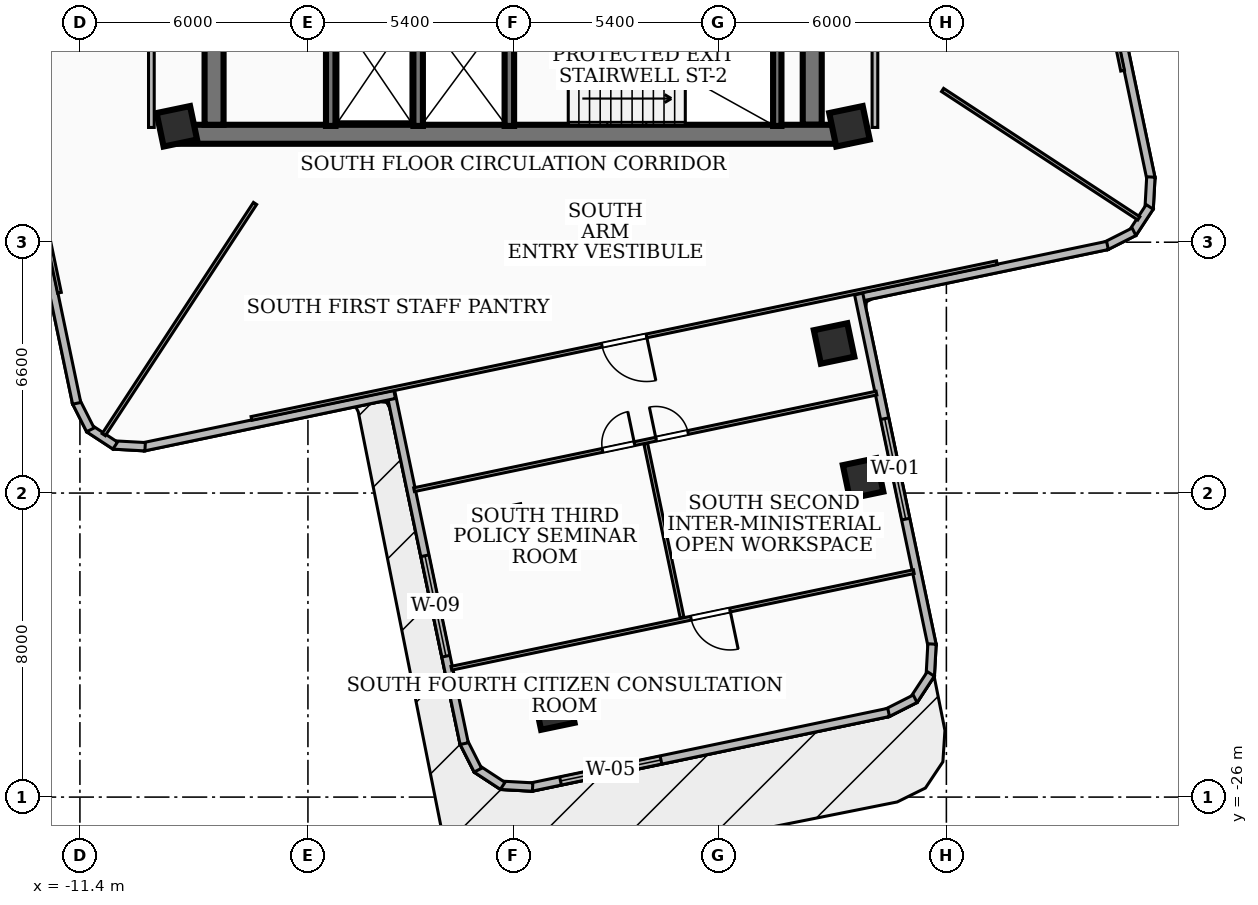
"""IFC4 building model, lengths in metres.
Left out: names, types, materials, properties, quantities, classifications, styles, units other than length and angle.
Written with IfcOpenShell. Run it as: python <this file> out.ifc"""

import sys

from ifc_helpers import new_model, si_unit, direction, frame, frame_2d, origin, origin_2d, place, context, subcontext, project, spatial, rectangle, extrude, element, fill, save


model = new_model("IFC4")
c1 = context("Model", 3, precision=1e-05, world=origin(), true_north=direction((0.0, 1.0)))
c2 = subcontext(c1, "Body", "Model", "MODEL_VIEW")
j1 = project(units=[si_unit("LENGTHUNIT", "METRE"), si_unit("PLANEANGLEUNIT", "RADIAN")], contexts=[c1])
p1 = place(None, origin())
s1 = spatial("IfcSite", under=j1, at=p1, CompositionType="ELEMENT")
p2 = place(p1, origin())
s2 = spatial("IfcBuilding", under=s1, at=p2, CompositionType="ELEMENT")
p3 = place(p2, frame((0.0, 0.0, 111.96)))
s3 = spatial("IfcBuildingStorey", under=s2, at=p3, CompositionType="ELEMENT", Elevation=111.96)
p4 = place(p3, frame((8.78, -8.56, 0.0), z_axis=(0.0, 0.0, 1.0), x_axis=(-1.0, 0.0, 0.0)))
e1 = element("IfcWall", 1, at=p4, inside=s3, PredefinedType="SHEAR", context=c2, shape_type="SweptSolid", body=[
    extrude(rectangle(XDim=17.56, YDim=0.5, at=frame_2d((8.78, 0.0))), origin(), (0.0, 0.0, 1.0), 4.06),
])
for number, where, z_axis, x_axis in (
    (2, (-7.87, -8.31, 0.0), (0.0, 0.0, 1.0), (0.0, 1.0, 0.0)),
    (3, (7.87, -2.0, 0.0), (0.0, 0.0, 1.0), (0.0, -1.0, 0.0)),
):
    element("IfcWall", number, at=place(p3, frame(where, z_axis=z_axis, x_axis=x_axis)), inside=s3, PredefinedType="SHEAR", context=c2, shape_type="SweptSolid", body=[
        extrude(rectangle(XDim=6.31, YDim=0.5, at=frame_2d((3.155, 0.0))), origin(), (0.0, 0.0, 1.0), 4.06),
    ])
p5 = place(p3, frame((6.95, -8.34, 0.0), z_axis=(0.0, 0.0, 1.0), x_axis=(0.0, 1.0, 0.0)))
e4 = element("IfcWall", 4, at=p5, inside=s3, PredefinedType="SOLIDWALL", context=c2, shape_type="SweptSolid", body=[
    extrude(rectangle(XDim=3.06, YDim=0.22, at=frame_2d((1.53, 0.0))), origin(), (0.0, 0.0, 1.0), 4.06),
])
for number, where, z_axis, x_axis in (
    (5, (-0.1, -8.34, 0.0), (0.0, 0.0, 1.0), (0.0, 1.0, 0.0)),
    (6, (-2.5, -8.34, 0.0), (0.0, 0.0, 1.0), (0.0, 1.0, 0.0)),
    (7, (-4.8, -8.34, 0.0), (0.0, 0.0, 1.0), (0.0, 1.0, 0.0)),
):
    element("IfcWall", number, at=place(p3, frame(where, z_axis=z_axis, x_axis=x_axis)), inside=s3, PredefinedType="SOLIDWALL", context=c2, shape_type="SweptSolid", body=[
        extrude(rectangle(XDim=3.04, YDim=0.25, at=frame_2d((1.52, 0.0))), origin(), (0.0, 0.0, 1.0), 4.06),
    ])
for number, where, z_axis, x_axis in (
    (8, (8.85, -8.35, 0.0), (0.0, 0.0, 1.0), (0.979, 0.204, 0.0)),
    (9, (-8.85, -8.35, 0.0), (0.0, 0.0, 1.0), (0.979, 0.204, 0.0)),
    (10, (-0.183, -18.86, 0.0), (0.0, 0.0, 1.0), (0.979, 0.204, 0.0)),
    (11, (8.445, -14.064, 0.0), (0.0, 0.0, 1.0), (0.979, 0.204, 0.0)),
    (12, (1.083, -23.697, 0.0), (0.0, 0.0, 1.0), (0.979, 0.204, 0.0)),
    (13, (9.208, -17.615, 0.0), (0.0, 0.0, 1.0), (0.979, 0.204, 0.0)),
):
    element("IfcColumn", number, at=place(p3, frame(where, z_axis=z_axis, x_axis=x_axis)), inside=s3, PredefinedType="COLUMN", context=c2, shape_type="SweptSolid", body=[
        extrude(rectangle(XDim=0.9, YDim=0.9, at=origin_2d()), origin(), (0.0, 0.0, 1.0), 4.32),
    ])
p6 = place(p3, frame((15.403, -3.119, 0.0), z_axis=(0.0, 0.0, 1.0), x_axis=(0.204509735336, -0.978864530031, 0.0)))
e14 = element("IfcWall", 14, at=p6, inside=s3, PredefinedType="SOLIDWALL", context=c2, shape_type="SweptSolid", body=[
    extrude(rectangle(XDim=6.757, YDim=0.22, at=frame_2d((3.378, 0.0))), origin(), (0.0, 0.0, 1.0), 4.06),
])
p7 = place(p3, frame((16.781, -9.684, 0.0), z_axis=(0.0, 0.0, 1.0), x_axis=(-0.055016197793, -0.998485462078, 0.0)))
e15 = element("IfcWall", 15, at=p7, inside=s3, PredefinedType="SOLIDWALL", context=c2, shape_type="SweptSolid", body=[
    extrude(rectangle(XDim=0.834, YDim=0.22, at=frame_2d((0.417, 0.0))), origin(), (0.0, 0.0, 1.0), 4.06),
])
p8 = place(p3, frame((16.75, -10.471, 0.0), z_axis=(0.0, 0.0, 1.0), x_axis=(-0.54760232045, -0.836738727822, 0.0)))
e16 = element("IfcWall", 16, at=p8, inside=s3, PredefinedType="SOLIDWALL", context=c2, shape_type="SweptSolid", body=[
    extrude(rectangle(XDim=0.82, YDim=0.22, at=frame_2d((0.41, 0.0))), origin(), (0.0, 0.0, 1.0), 4.06),
])
p9 = place(p3, frame((16.337, -11.125, 0.0), z_axis=(0.0, 0.0, 1.0), x_axis=(-0.892485652426, -0.45107578101, 0.0)))
e17 = element("IfcWall", 17, at=p9, inside=s3, PredefinedType="SOLIDWALL", context=c2, shape_type="SweptSolid", body=[
    extrude(rectangle(XDim=0.833, YDim=0.22, at=frame_2d((0.417, 0.0))), origin(), (0.0, 0.0, 1.0), 4.06),
])
p10 = place(p3, frame((15.639, -11.485, 0.0), z_axis=(0.0, 0.0, 1.0), x_axis=(-0.978870573598, -0.204480806295, 0.0)))
e18 = element("IfcWall", 18, at=p10, inside=s3, PredefinedType="SOLIDWALL", context=c2, shape_type="SweptSolid", body=[
    extrude(rectangle(XDim=6.758, YDim=0.22, at=frame_2d((3.379, 0.0))), origin(), (0.0, 0.0, 1.0), 4.06),
])
p11 = place(p3, frame((9.092, -12.763, 0.0), z_axis=(0.0, 0.0, 1.0), x_axis=(0.204468605798, -0.978873122137, 0.0)))
e19 = element("IfcWall", 19, at=p11, inside=s3, PredefinedType="SOLIDWALL", context=c2, shape_type="SweptSolid", body=[
    extrude(rectangle(XDim=9.458, YDim=0.22, at=frame_2d((4.729, 0.0))), origin(), (0.0, 0.0, 1.0), 4.06),
])
p12 = place(p11, frame((3.35, 0.0, 0.85)))
e20 = element("IfcOpeningElement", 20, at=p12, cuts=e19, PredefinedType="OPENING", context=c2, shape_type="SweptSolid", body=[
    extrude(rectangle(XDim=2.7, YDim=2.1, at=frame_2d((1.35, 1.05))), frame((0.0, 0.12, 0.0), z_axis=(0.0, -1.0, 0.0), x_axis=(1.0, 0.0, 0.0)), (0.0, 0.0, 1.0), 0.24),
])
p13 = place(p3, frame((11.022, -21.972, 0.0), z_axis=(0.0, 0.0, 1.0), x_axis=(-0.055016197793, -0.998485462078, 0.0)))
e21 = element("IfcWall", 21, at=p13, inside=s3, PredefinedType="SOLIDWALL", context=c2, shape_type="SweptSolid", body=[
    extrude(rectangle(XDim=0.834, YDim=0.22, at=frame_2d((0.417, 0.0))), origin(), (0.0, 0.0, 1.0), 4.06),
])
p14 = place(p3, frame((10.991, -22.759, 0.0), z_axis=(0.0, 0.0, 1.0), x_axis=(-0.548148504297, -0.836381023958, 0.0)))
e22 = element("IfcWall", 22, at=p14, inside=s3, PredefinedType="SOLIDWALL", context=c2, shape_type="SweptSolid", body=[
    extrude(rectangle(XDim=0.819, YDim=0.22, at=frame_2d((0.41, 0.0))), origin(), (0.0, 0.0, 1.0), 4.06),
])
p15 = place(p3, frame((10.578, -23.412, 0.0), z_axis=(0.0, 0.0, 1.0), x_axis=(-0.892485652426, -0.45107578101, 0.0)))
e23 = element("IfcWall", 23, at=p15, inside=s3, PredefinedType="SOLIDWALL", context=c2, shape_type="SweptSolid", body=[
    extrude(rectangle(XDim=0.833, YDim=0.22, at=frame_2d((0.417, 0.0))), origin(), (0.0, 0.0, 1.0), 4.06),
])
p16 = place(p3, frame((9.88, -23.772, 0.0), z_axis=(0.0, 0.0, 1.0), x_axis=(-0.978873030385, -0.204469045054, 0.0)))
e24 = element("IfcWall", 24, at=p16, inside=s3, PredefinedType="SOLIDWALL", context=c2, shape_type="SweptSolid", body=[
    extrude(rectangle(XDim=9.62, YDim=0.22, at=frame_2d((4.81, 0.0))), origin(), (0.0, 0.0, 1.0), 4.06),
])
p17 = place(p16, frame((6.12, 0.0, 0.85)))
e25 = element("IfcOpeningElement", 25, at=p17, cuts=e24, PredefinedType="OPENING", context=c2, shape_type="SweptSolid", body=[
    extrude(rectangle(XDim=2.7, YDim=1.85, at=frame_2d((1.35, 0.925))), frame((0.0, 0.12, 0.0), z_axis=(0.0, -1.0, 0.0), x_axis=(1.0, 0.0, 0.0)), (0.0, 0.0, 1.0), 0.24),
])
p18 = place(p3, frame((0.512, -25.735, 0.0), z_axis=(0.0, 0.0, 1.0), x_axis=(-0.998469344193, 0.05530794433, 0.0)))
e26 = element("IfcWall", 26, at=p18, inside=s3, PredefinedType="SOLIDWALL", context=c2, shape_type="SweptSolid", body=[
    extrude(rectangle(XDim=0.834, YDim=0.22, at=frame_2d((0.417, 0.0))), origin(), (0.0, 0.0, 1.0), 4.06),
])
p19 = place(p3, frame((-0.275, -25.704, 0.0), z_axis=(0.0, 0.0, 1.0), x_axis=(-0.836244367386, 0.54835696222, 0.0)))
e27 = element("IfcWall", 27, at=p19, inside=s3, PredefinedType="SOLIDWALL", context=c2, shape_type="SweptSolid", body=[
    extrude(rectangle(XDim=0.819, YDim=0.22, at=frame_2d((0.41, 0.0))), origin(), (0.0, 0.0, 1.0), 4.06),
])
p20 = place(p3, frame((-0.928, -25.291, 0.0), z_axis=(0.0, 0.0, 1.0), x_axis=(-0.45107578101, 0.892485652426, 0.0)))
e28 = element("IfcWall", 28, at=p20, inside=s3, PredefinedType="SOLIDWALL", context=c2, shape_type="SweptSolid", body=[
    extrude(rectangle(XDim=0.833, YDim=0.22, at=frame_2d((0.417, 0.0))), origin(), (0.0, 0.0, 1.0), 4.06),
])
p21 = place(p3, frame((-1.288, -24.593, 0.0), z_axis=(0.0, 0.0, 1.0), x_axis=(-0.20456753982, 0.978852451421, 0.0)))
e29 = element("IfcWall", 29, at=p21, inside=s3, PredefinedType="SOLIDWALL", context=c2, shape_type="SweptSolid", body=[
    extrude(rectangle(XDim=9.458, YDim=0.22, at=frame_2d((4.729, 0.0))), origin(), (0.0, 0.0, 1.0), 3.29),
])
p22 = place(p21, frame((2.35, 0.0, 0.85)))
e30 = element("IfcOpeningElement", 30, at=p22, cuts=e29, PredefinedType="OPENING", context=c2, shape_type="SweptSolid", body=[
    extrude(rectangle(XDim=2.7, YDim=1.65, at=frame_2d((1.35, 0.825))), frame((0.0, 0.12, 0.0), z_axis=(0.0, -1.0, 0.0), x_axis=(1.0, 0.0, 0.0)), (0.0, 0.0, 1.0), 0.24),
])
p23 = place(p3, frame((-3.119, -15.403, 0.0), z_axis=(0.0, 0.0, 1.0), x_axis=(-0.978864530031, -0.204509735336, 0.0)))
e31 = element("IfcWall", 31, at=p23, inside=s3, PredefinedType="SOLIDWALL", context=c2, shape_type="SweptSolid", body=[
    extrude(rectangle(XDim=6.757, YDim=0.22, at=frame_2d((3.378, 0.0))), origin(), (0.0, 0.0, 1.0), 3.29),
])
p24 = place(p3, frame((-9.684, -16.781, 0.0), z_axis=(0.0, 0.0, 1.0), x_axis=(-0.998485462078, 0.055016197793, 0.0)))
e32 = element("IfcWall", 32, at=p24, inside=s3, PredefinedType="SOLIDWALL", context=c2, shape_type="SweptSolid", body=[
    extrude(rectangle(XDim=0.834, YDim=0.22, at=frame_2d((0.417, 0.0))), origin(), (0.0, 0.0, 1.0), 4.06),
])
p25 = place(p3, frame((-10.471, -16.75, 0.0), z_axis=(0.0, 0.0, 1.0), x_axis=(-0.836738727822, 0.54760232045, 0.0)))
e33 = element("IfcWall", 33, at=p25, inside=s3, PredefinedType="SOLIDWALL", context=c2, shape_type="SweptSolid", body=[
    extrude(rectangle(XDim=0.82, YDim=0.22, at=frame_2d((0.41, 0.0))), origin(), (0.0, 0.0, 1.0), 4.06),
])
p26 = place(p3, frame((-11.125, -16.337, 0.0), z_axis=(0.0, 0.0, 1.0), x_axis=(-0.45107578101, 0.892485652426, 0.0)))
e34 = element("IfcWall", 34, at=p26, inside=s3, PredefinedType="SOLIDWALL", context=c2, shape_type="SweptSolid", body=[
    extrude(rectangle(XDim=0.833, YDim=0.22, at=frame_2d((0.417, 0.0))), origin(), (0.0, 0.0, 1.0), 4.06),
])
p27 = place(p3, frame((-11.485, -15.639, 0.0), z_axis=(0.0, 0.0, 1.0), x_axis=(-0.204480806295, 0.978870573598, 0.0)))
e35 = element("IfcWall", 35, at=p27, inside=s3, PredefinedType="SOLIDWALL", context=c2, shape_type="SweptSolid", body=[
    extrude(rectangle(XDim=6.758, YDim=0.22, at=frame_2d((3.379, 0.0))), origin(), (0.0, 0.0, 1.0), 4.06),
])
for number, where, z_axis, x_axis in (
    (36, (-9.52, -8.38, 0.0), (0.0, 0.0, 1.0), (0.0, 1.0, 0.0)),
    (37, (9.52, -8.38, 0.0), (0.0, 0.0, 1.0), (0.0, 1.0, 0.0)),
):
    element("IfcWall", number, at=place(p3, frame(where, z_axis=z_axis, x_axis=x_axis)), inside=s3, PredefinedType="PARTITIONING", context=c2, shape_type="SweptSolid", body=[
        extrude(rectangle(XDim=6.63, YDim=0.15, at=frame_2d((3.315, 0.0))), origin(), (0.0, 0.0, 1.0), 3.29),
    ])
p28 = place(p3, frame((-6.792, -10.38, 0.0), z_axis=(0.0, 0.0, 1.0), x_axis=(-0.547596764532, -0.836742363858, 0.0)))
e38 = element("IfcWall", 38, at=p28, inside=s3, PredefinedType="PARTITIONING", context=c2, shape_type="SweptSolid", body=[
    extrude(rectangle(XDim=7.27, YDim=0.1, at=frame_2d((3.635, 0.0))), origin(), (0.0, 0.0, 1.0), 3.29),
])
p29 = place(p3, frame((11.3, -7.394, 0.0), z_axis=(0.0, 0.0, 1.0), x_axis=(0.836731843599, -0.547612839429, 0.0)))
e39 = element("IfcWall", 39, at=p29, inside=s3, PredefinedType="PARTITIONING", context=c2, shape_type="SweptSolid", body=[
    extrude(rectangle(XDim=6.17, YDim=0.1, at=frame_2d((3.085, 0.0))), origin(), (0.0, 0.0, 1.0), 4.06),
])
p30 = place(p3, frame((11.939, 12.73, 0.0), z_axis=(0.0, 0.0, 1.0), x_axis=(0.204503489908, -0.978865834839, 0.0)))
e40 = element("IfcWall", 40, at=p30, inside=s3, PredefinedType="PARTITIONING", context=c2, shape_type="SweptSolid", body=[
    extrude(rectangle(XDim=20.04, YDim=0.1, at=frame_2d((10.02, 0.0))), origin(), (0.0, 0.0, 1.0), 3.29),
])
p31 = place(p30, frame((9.42, 0.0, 0.0)))
e41 = element("IfcOpeningElement", 41, at=p31, cuts=e40, PredefinedType="OPENING", context=c2, shape_type="SweptSolid", body=[
    extrude(rectangle(XDim=1.2, YDim=2.1, at=frame_2d((0.6, 1.05))), frame((0.0, 0.06, 0.0), z_axis=(0.0, -1.0, 0.0), x_axis=(1.0, 0.0, 0.0)), (0.0, 0.0, 1.0), 0.12),
])
p32 = place(p3, frame((-11.939, -12.73, 0.0), z_axis=(0.0, 0.0, 1.0), x_axis=(-0.204503489908, 0.978865834839, 0.0)))
e42 = element("IfcWall", 42, at=p32, inside=s3, PredefinedType="PARTITIONING", context=c2, shape_type="SweptSolid", body=[
    extrude(rectangle(XDim=20.04, YDim=0.1, at=frame_2d((10.02, 0.0))), origin(), (0.0, 0.0, 1.0), 3.29),
])
p33 = place(p32, frame((9.42, 0.0, 0.0)))
e43 = element("IfcOpeningElement", 43, at=p33, cuts=e42, PredefinedType="OPENING", context=c2, shape_type="SweptSolid", body=[
    extrude(rectangle(XDim=1.2, YDim=2.1, at=frame_2d((0.6, 1.05))), frame((0.0, 0.06, 0.0), z_axis=(0.0, -1.0, 0.0), x_axis=(1.0, 0.0, 0.0)), (0.0, 0.0, 1.0), 0.12),
])
p34 = place(p3, frame((12.73, -11.939, 0.0), z_axis=(0.0, 0.0, 1.0), x_axis=(-0.978865834839, -0.204503489908, 0.0)))
e44 = element("IfcWall", 44, at=p34, inside=s3, PredefinedType="PARTITIONING", context=c2, shape_type="SweptSolid", body=[
    extrude(rectangle(XDim=20.04, YDim=0.1, at=frame_2d((10.02, 0.0))), origin(), (0.0, 0.0, 1.0), 3.29),
])
p35 = place(p34, frame((9.42, 0.0, 0.0)))
e45 = element("IfcOpeningElement", 45, at=p35, cuts=e44, PredefinedType="OPENING", context=c2, shape_type="SweptSolid", body=[
    extrude(rectangle(XDim=1.2, YDim=2.1, at=frame_2d((0.6, 1.05))), frame((0.0, 0.06, 0.0), z_axis=(0.0, -1.0, 0.0), x_axis=(1.0, 0.0, 0.0)), (0.0, 0.0, 1.0), 0.12),
])
p36 = place(p3, frame((3.489, -16.699, 0.0), z_axis=(0.0, 0.0, 1.0), x_axis=(0.204454098321, -0.97887615237, 0.0)))
e46 = element("IfcWall", 46, at=p36, inside=s3, PredefinedType="PARTITIONING", context=c2, shape_type="SweptSolid", body=[
    extrude(rectangle(XDim=4.681, YDim=0.1, at=frame_2d((2.34, 0.0))), origin(), (0.0, 0.0, 1.0), 3.44),
])
p37 = place(p3, frame((-2.607, -17.912, 0.0), z_axis=(0.0, 0.0, 1.0), x_axis=(0.978864568929, 0.204509549155, 0.0)))
e47 = element("IfcWall", 47, at=p37, inside=s3, PredefinedType="PARTITIONING", context=c2, shape_type="SweptSolid", body=[
    extrude(rectangle(XDim=12.43, YDim=0.1, at=frame_2d((6.215, 0.0))), origin(), (0.0, 0.0, 1.0), 3.29),
])
p38 = place(p37, frame((5.065, 0.0, 0.0)))
e48 = element("IfcOpeningElement", 48, at=p38, cuts=e47, PredefinedType="OPENING", context=c2, shape_type="SweptSolid", body=[
    extrude(rectangle(XDim=0.86, YDim=2.04, at=frame_2d((0.43, 1.02))), frame((0.0, 0.06, 0.0), z_axis=(0.0, -1.0, 0.0), x_axis=(1.0, 0.0, 0.0)), (0.0, 0.0, 1.0), 0.12),
])
p39 = place(p37, frame((6.505, 0.0, 0.0)))
e49 = element("IfcOpeningElement", 49, at=p39, cuts=e47, PredefinedType="OPENING", context=c2, shape_type="SweptSolid", body=[
    extrude(rectangle(XDim=0.86, YDim=2.04, at=frame_2d((0.43, 1.02))), frame((0.0, 0.06, 0.0), z_axis=(0.0, -1.0, 0.0), x_axis=(1.0, 0.0, 0.0)), (0.0, 0.0, 1.0), 0.12),
])
p40 = place(p3, frame((10.542, -20.068, 0.0), z_axis=(0.0, 0.0, 1.0), x_axis=(-0.978867854543, -0.204493822261, 0.0)))
e50 = element("IfcWall", 50, at=p40, inside=s3, PredefinedType="PARTITIONING", context=c2, shape_type="SweptSolid", body=[
    extrude(rectangle(XDim=12.431, YDim=0.1, at=frame_2d((6.215, 0.0))), origin(), (0.0, 0.0, 1.0), 3.29),
])
p41 = place(p40, frame((4.94, 0.0, 0.0)))
e51 = element("IfcOpeningElement", 51, at=p41, cuts=e50, PredefinedType="OPENING", context=c2, shape_type="SweptSolid", body=[
    extrude(rectangle(XDim=1.05, YDim=2.08, at=frame_2d((0.525, 1.04))), frame((0.0, 0.06, 0.0), z_axis=(0.0, -1.0, 0.0), x_axis=(1.0, 0.0, 0.0)), (0.0, 0.0, 1.0), 0.12),
])
p42 = place(p12, origin())
e52 = element("IfcWindow", 52, at=p42, inside=s3, PartitioningType="SINGLE_PANEL", PredefinedType="WINDOW", context=c2, shape_type="SweptSolid", body=[
    extrude(rectangle(XDim=2.7, YDim=2.1, at=frame_2d((1.35, 1.05))), frame((0.0, 0.03, 0.0), z_axis=(0.0, -1.0, 0.0), x_axis=(1.0, 0.0, 0.0)), (0.0, 0.0, 1.0), 0.06),
])
fill(e20, e52)
p43 = place(p17, origin())
e53 = element("IfcWindow", 53, at=p43, inside=s3, PartitioningType="SINGLE_PANEL", PredefinedType="WINDOW", context=c2, shape_type="SweptSolid", body=[
    extrude(rectangle(XDim=2.7, YDim=1.85, at=frame_2d((1.35, 0.925))), frame((0.0, 0.03, 0.0), z_axis=(0.0, -1.0, 0.0), x_axis=(1.0, 0.0, 0.0)), (0.0, 0.0, 1.0), 0.06),
])
fill(e25, e53)
p44 = place(p22, origin())
e54 = element("IfcWindow", 54, at=p44, inside=s3, PartitioningType="SINGLE_PANEL", PredefinedType="WINDOW", context=c2, shape_type="SweptSolid", body=[
    extrude(rectangle(XDim=2.7, YDim=1.65, at=frame_2d((1.35, 0.825))), frame((0.0, 0.03, 0.0), z_axis=(0.0, -1.0, 0.0), x_axis=(1.0, 0.0, 0.0)), (0.0, 0.0, 1.0), 0.06),
])
fill(e30, e54)
p45 = place(p35, origin())
e55 = element("IfcDoor", 55, at=p45, inside=s3, OperationType="SINGLE_SWING_LEFT", PredefinedType="DOOR", context=c2, shape_type="SweptSolid", body=[
    extrude(rectangle(XDim=1.2, YDim=2.1, at=frame_2d((0.6, 1.05))), frame((0.0, 0.025, 0.0), z_axis=(0.0, -1.0, 0.0), x_axis=(1.0, 0.0, 0.0)), (0.0, 0.0, 1.0), 0.05),
])
fill(e45, e55)
p46 = place(p38, origin())
e56 = element("IfcDoor", 56, at=p46, inside=s3, OperationType="SINGLE_SWING_RIGHT", PredefinedType="DOOR", context=c2, shape_type="SweptSolid", body=[
    extrude(rectangle(XDim=0.86, YDim=2.04, at=frame_2d((0.43, 1.02))), frame((0.0, 0.025, 0.0), z_axis=(0.0, -1.0, 0.0), x_axis=(1.0, 0.0, 0.0)), (0.0, 0.0, 1.0), 0.05),
])
fill(e48, e56)
p47 = place(p39, origin())
e57 = element("IfcDoor", 57, at=p47, inside=s3, OperationType="SINGLE_SWING_LEFT", PredefinedType="DOOR", context=c2, shape_type="SweptSolid", body=[
    extrude(rectangle(XDim=0.86, YDim=2.04, at=frame_2d((0.43, 1.02))), frame((0.0, 0.025, 0.0), z_axis=(0.0, -1.0, 0.0), x_axis=(1.0, 0.0, 0.0)), (0.0, 0.0, 1.0), 0.05),
])
fill(e49, e57)
p48 = place(p41, origin())
e58 = element("IfcDoor", 58, at=p48, inside=s3, OperationType="SINGLE_SWING_LEFT", PredefinedType="DOOR", context=c2, shape_type="SweptSolid", body=[
    extrude(rectangle(XDim=1.05, YDim=2.08, at=frame_2d((0.525, 1.04))), frame((0.0, 0.025, 0.0), z_axis=(0.0, -1.0, 0.0), x_axis=(1.0, 0.0, 0.0)), (0.0, 0.0, 1.0), 0.05),
])
fill(e51, e58)
save(model, sys.argv[1])
